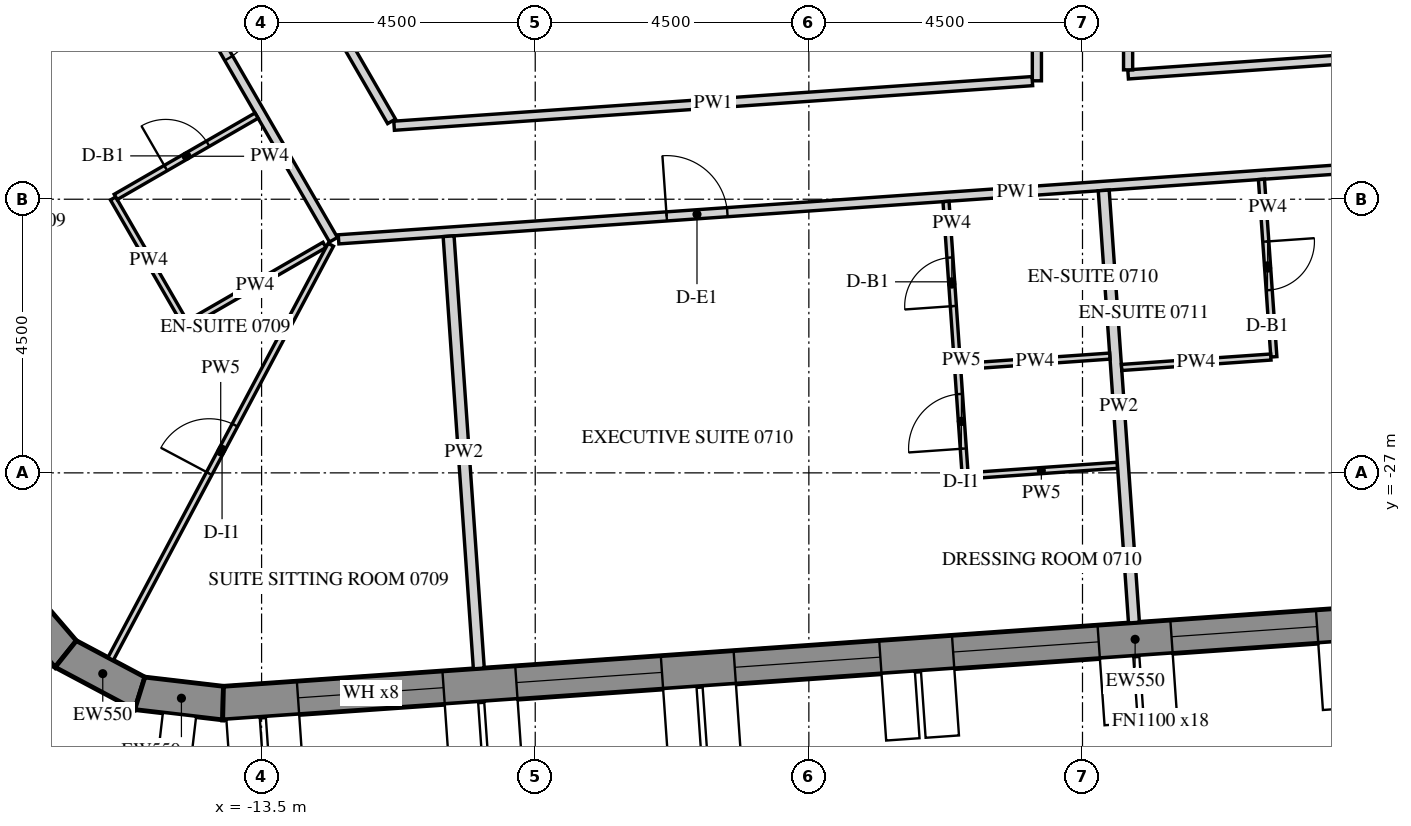
"""IFC4 building model, lengths in metres.
Left out: names, types, materials, properties, quantities, classifications, styles, units other than length and angle.
Written with IfcOpenShell. Run it as: python <this file> out.ifc"""

import sys

from ifc_helpers import new_model, si_unit, direction, frame, frame_2d, origin, place, context, subcontext, project, spatial, polyline, rectangle, outline, extrude, element, fill, save


model = new_model("IFC4")
c1 = context("Model", 3, precision=1e-05, world=origin(), true_north=direction((0.0, 1.0)))
c2 = subcontext(c1, "Body", "Model", "MODEL_VIEW")
j1 = project(units=[si_unit("LENGTHUNIT", "METRE"), si_unit("PLANEANGLEUNIT", "RADIAN")], contexts=[c1])
p1 = place(None, origin())
s1 = spatial("IfcSite", under=j1, at=p1, CompositionType="ELEMENT")
p2 = place(p1, origin())
s2 = spatial("IfcBuilding", under=s1, at=p2, CompositionType="ELEMENT")
p3 = place(p2, frame((0.0, 0.0, 99.9)))
s3 = spatial("IfcBuildingStorey", under=s2, at=p3, CompositionType="ELEMENT", Elevation=99.9)
p4 = place(p3, frame((-17.619, -28.932, -0.15), z_axis=(0.0, 0.0, 1.0), x_axis=(0.651621950847, -0.758543890078, 0.0)))
e1 = element("IfcWall", 1, at=p4, inside=s3, PredefinedType="SOLIDWALL", context=c2, shape_type="SweptSolid", body=[
    extrude(outline(polyline([(-0.026, -0.275), (1.431, -0.275), (1.327, 0.275), (0.026, 0.275), (-0.026, -0.275)])), origin(), (0.0, 0.0, 1.0), 3.9),
])
p5 = place(p3, frame((-16.721, -29.979, -0.15), z_axis=(0.0, 0.0, 1.0), x_axis=(0.882994189209, -0.469383917304, 0.0)))
e2 = element("IfcWall", 2, at=p5, inside=s3, PredefinedType="SOLIDWALL", context=c2, shape_type="SweptSolid", body=[
    extrude(outline(polyline([(-0.052, -0.275), (1.431, -0.275), (1.327, 0.275), (0.052, 0.275), (-0.052, -0.275)])), origin(), (0.0, 0.0, 1.0), 3.9),
])
p6 = place(p3, frame((-15.503, -30.626, -0.15), z_axis=(0.0, 0.0, 1.0), x_axis=(0.993232537394, -0.11614269956, 0.0)))
e3 = element("IfcWall", 3, at=p6, inside=s3, PredefinedType="SOLIDWALL", context=c2, shape_type="SweptSolid", body=[
    extrude(outline(polyline([(-0.052, -0.275), (1.405, -0.275), (1.353, 0.275), (0.052, 0.275), (-0.052, -0.275)])), origin(), (0.0, 0.0, 1.0), 3.9),
])
p7 = place(p3, frame((-14.134, -30.786, -0.15), z_axis=(0.0, 0.0, 1.0), x_axis=(0.997564037441, 0.069756657061, 0.0)))
e4 = element("IfcWall", 4, at=p7, inside=s3, PredefinedType="SOLIDWALL", context=c2, shape_type="SweptSolid", body=[
    extrude(outline(polyline([(-0.026, -0.275), (30.094, -0.275), (30.049, 0.275), (0.026, 0.275), (-0.026, -0.275)])), origin(), (0.0, 0.0, 1.0), 3.9),
])
p8 = place(p7, frame((1.236, 0.0, 1.05)))
e5 = element("IfcOpeningElement", 5, at=p8, cuts=e4, PredefinedType="OPENING", context=c2, shape_type="SweptSolid", body=[
    extrude(rectangle(XDim=2.4, YDim=2.4, at=frame_2d((1.2, 1.2))), frame((0.0, 0.285, 0.0), z_axis=(0.0, -1.0, 0.0), x_axis=(1.0, 0.0, 0.0)), (0.0, 0.0, 1.0), 0.57),
])
p9 = place(p7, frame((4.835, 0.0, 1.05)))
e6 = element("IfcOpeningElement", 6, at=p9, cuts=e4, PredefinedType="OPENING", context=c2, shape_type="SweptSolid", body=[
    extrude(rectangle(XDim=2.4, YDim=2.4, at=frame_2d((1.2, 1.2))), frame((0.0, 0.285, 0.0), z_axis=(0.0, -1.0, 0.0), x_axis=(1.0, 0.0, 0.0)), (0.0, 0.0, 1.0), 0.57),
])
p10 = place(p7, frame((8.436, 0.0, 1.05)))
e7 = element("IfcOpeningElement", 7, at=p10, cuts=e4, PredefinedType="OPENING", context=c2, shape_type="SweptSolid", body=[
    extrude(rectangle(XDim=2.4, YDim=2.4, at=frame_2d((1.2, 1.2))), frame((0.0, 0.285, 0.0), z_axis=(0.0, -1.0, 0.0), x_axis=(1.0, 0.0, 0.0)), (0.0, 0.0, 1.0), 0.57),
])
p11 = place(p7, frame((12.035, 0.0, 1.05)))
e8 = element("IfcOpeningElement", 8, at=p11, cuts=e4, PredefinedType="OPENING", context=c2, shape_type="SweptSolid", body=[
    extrude(rectangle(XDim=2.4, YDim=2.4, at=frame_2d((1.2, 1.2))), frame((0.0, 0.285, 0.0), z_axis=(0.0, -1.0, 0.0), x_axis=(1.0, 0.0, 0.0)), (0.0, 0.0, 1.0), 0.57),
])
p12 = place(p7, frame((15.635, 0.0, 1.05)))
e9 = element("IfcOpeningElement", 9, at=p12, cuts=e4, PredefinedType="OPENING", context=c2, shape_type="SweptSolid", body=[
    extrude(rectangle(XDim=2.4, YDim=2.4, at=frame_2d((1.2, 1.2))), frame((0.0, 0.285, 0.0), z_axis=(0.0, -1.0, 0.0), x_axis=(1.0, 0.0, 0.0)), (0.0, 0.0, 1.0), 0.57),
])
p13 = place(p7, frame((19.236, 0.0, 1.05)))
e10 = element("IfcOpeningElement", 10, at=p13, cuts=e4, PredefinedType="OPENING", context=c2, shape_type="SweptSolid", body=[
    extrude(rectangle(XDim=2.4, YDim=2.4, at=frame_2d((1.2, 1.2))), frame((0.0, 0.285, 0.0), z_axis=(0.0, -1.0, 0.0), x_axis=(1.0, 0.0, 0.0)), (0.0, 0.0, 1.0), 0.57),
])
p14 = place(p7, frame((22.835, 0.0, 1.05)))
e11 = element("IfcOpeningElement", 11, at=p14, cuts=e4, PredefinedType="OPENING", context=c2, shape_type="SweptSolid", body=[
    extrude(rectangle(XDim=2.4, YDim=2.4, at=frame_2d((1.2, 1.2))), frame((0.0, 0.285, 0.0), z_axis=(0.0, -1.0, 0.0), x_axis=(1.0, 0.0, 0.0)), (0.0, 0.0, 1.0), 0.57),
])
p15 = place(p7, frame((26.436, 0.0, 1.05)))
e12 = element("IfcOpeningElement", 12, at=p15, cuts=e4, PredefinedType="OPENING", context=c2, shape_type="SweptSolid", body=[
    extrude(rectangle(XDim=2.4, YDim=2.4, at=frame_2d((1.2, 1.2))), frame((0.0, 0.285, 0.0), z_axis=(0.0, -1.0, 0.0), x_axis=(1.0, 0.0, 0.0)), (0.0, 0.0, 1.0), 0.57),
])
p16 = place(p3, frame((-24.436, -2.175, 0.0), z_axis=(0.0, 0.0, 1.0), x_axis=(0.499996816197, -0.866027241946, 0.0)))
e13 = element("IfcWall", 13, at=p16, inside=s3, PredefinedType="PARTITIONING", context=c2, shape_type="SweptSolid", body=[
    extrude(rectangle(XDim=24.238, YDim=0.15, at=frame_2d((12.119, 0.0))), origin(), (0.0, 0.0, 1.0), 2.988),
])
p17 = place(p16, frame((0.179, 0.0, 0.0)))
e14 = element("IfcOpeningElement", 14, at=p17, cuts=e13, PredefinedType="OPENING", context=c2, shape_type="SweptSolid", body=[
    extrude(rectangle(XDim=1.0, YDim=2.1, at=frame_2d((0.5, 1.05))), frame((0.0, 0.085, 0.0), z_axis=(0.0, -1.0, 0.0), x_axis=(1.0, 0.0, 0.0)), (0.0, 0.0, 1.0), 0.17),
])
p18 = place(p16, frame((12.246, 0.0, 0.0)))
e15 = element("IfcOpeningElement", 15, at=p18, cuts=e13, PredefinedType="OPENING", context=c2, shape_type="SweptSolid", body=[
    extrude(rectangle(XDim=1.0, YDim=2.1, at=frame_2d((0.5, 1.05))), frame((0.0, 0.085, 0.0), z_axis=(0.0, -1.0, 0.0), x_axis=(1.0, 0.0, 0.0)), (0.0, 0.0, 1.0), 0.17),
])
p19 = place(p16, frame((19.792, 0.0, 0.0)))
e16 = element("IfcOpeningElement", 16, at=p19, cuts=e13, PredefinedType="OPENING", context=c2, shape_type="SweptSolid", body=[
    extrude(rectangle(XDim=1.0, YDim=2.1, at=frame_2d((0.5, 1.05))), frame((0.0, 0.085, 0.0), z_axis=(0.0, -1.0, 0.0), x_axis=(1.0, 0.0, 0.0)), (0.0, 0.0, 1.0), 0.17),
])
p20 = place(p3, frame((-12.234, -23.16, 0.0), z_axis=(0.0, 0.0, 1.0), x_axis=(0.997563845372, 0.069759403714, 0.0)))
e17 = element("IfcWall", 17, at=p20, inside=s3, PredefinedType="PARTITIONING", context=c2, shape_type="SweptSolid", body=[
    extrude(rectangle(XDim=22.335, YDim=0.15, at=frame_2d((11.168, 0.0))), origin(), (0.0, 0.0, 1.0), 2.988),
])
p21 = place(p20, frame((5.409, 0.0, 0.0)))
e18 = element("IfcOpeningElement", 18, at=p21, cuts=e17, PredefinedType="OPENING", context=c2, shape_type="SweptSolid", body=[
    extrude(rectangle(XDim=1.0, YDim=2.1, at=frame_2d((0.5, 1.05))), frame((0.0, 0.085, 0.0), z_axis=(0.0, -1.0, 0.0), x_axis=(1.0, 0.0, 0.0)), (0.0, 0.0, 1.0), 0.17),
])
p22 = place(p20, frame((18.272, 0.0, 0.0)))
e19 = element("IfcOpeningElement", 19, at=p22, cuts=e17, PredefinedType="OPENING", context=c2, shape_type="SweptSolid", body=[
    extrude(rectangle(XDim=1.0, YDim=2.1, at=frame_2d((0.5, 1.05))), frame((0.0, 0.085, 0.0), z_axis=(0.0, -1.0, 0.0), x_axis=(1.0, 0.0, 0.0)), (0.0, 0.0, 1.0), 0.17),
])
p23 = place(p3, frame((-0.75, -14.0, 0.0), z_axis=(0.0, 0.0, 1.0), x_axis=(0.0, -1.0, 0.0)))
e20 = element("IfcWall", 20, at=p23, inside=s3, PredefinedType="PARTITIONING", context=c2, shape_type="SweptSolid", body=[
    extrude(rectangle(XDim=6.552, YDim=0.15, at=frame_2d((3.276, 0.0))), origin(), (0.0, 0.0, 1.0), 2.988),
])
p24 = place(p3, frame((-0.825, -20.558, 0.0), z_axis=(0.0, 0.0, 1.0), x_axis=(-0.997564524135, -0.069749696677, 0.0)))
e21 = element("IfcWall", 21, at=p24, inside=s3, PredefinedType="PARTITIONING", context=c2, shape_type="SweptSolid", body=[
    extrude(rectangle(XDim=10.522, YDim=0.15, at=frame_2d((5.261, 0.0))), origin(), (0.0, 0.0, 1.0), 2.988),
])
p25 = place(p3, frame((-11.363, -21.219, 0.0), z_axis=(0.0, 0.0, 1.0), x_axis=(-0.50001451402, 0.866017023949, 0.0)))
e22 = element("IfcWall", 22, at=p25, inside=s3, PredefinedType="PARTITIONING", context=c2, shape_type="SweptSolid", body=[
    extrude(rectangle(XDim=11.674, YDim=0.15, at=frame_2d((5.837, 0.0))), origin(), (0.0, 0.0, 1.0), 2.988),
])
p26 = place(p25, frame((5.387, 0.0, 0.0)))
e23 = element("IfcOpeningElement", 23, at=p26, cuts=e22, PredefinedType="OPENING", context=c2, shape_type="SweptSolid", body=[
    extrude(rectangle(XDim=0.9, YDim=2.1, at=frame_2d((0.45, 1.05))), frame((0.0, 0.085, 0.0), z_axis=(0.0, -1.0, 0.0), x_axis=(1.0, 0.0, 0.0)), (0.0, 0.0, 1.0), 0.17),
])
p27 = place(p3, frame((10.921, -19.736, 0.0), z_axis=(0.0, 0.0, 1.0), x_axis=(-0.997564418338, -0.069751209779, 0.0)))
e24 = element("IfcWall", 24, at=p27, inside=s3, PredefinedType="PARTITIONING", context=c2, shape_type="SweptSolid", body=[
    extrude(rectangle(XDim=10.196, YDim=0.15, at=frame_2d((5.098, 0.0))), origin(), (0.0, 0.0, 1.0), 2.988),
])
p28 = place(p27, frame((4.648, 0.0, 0.0)))
e25 = element("IfcOpeningElement", 25, at=p28, cuts=e24, PredefinedType="OPENING", context=c2, shape_type="SweptSolid", body=[
    extrude(rectangle(XDim=0.9, YDim=2.1, at=frame_2d((0.45, 1.05))), frame((0.0, 0.085, 0.0), z_axis=(0.0, -1.0, 0.0), x_axis=(1.0, 0.0, 0.0)), (0.0, 0.0, 1.0), 0.17),
])
p29 = place(p3, frame((0.75, -20.372, 0.0), z_axis=(0.0, 0.0, 1.0), x_axis=(0.0, 1.0, 0.0)))
e26 = element("IfcWall", 26, at=p29, inside=s3, PredefinedType="PARTITIONING", context=c2, shape_type="SweptSolid", body=[
    extrude(rectangle(XDim=6.372, YDim=0.15, at=frame_2d((3.186, 0.0))), origin(), (0.0, 0.0, 1.0), 2.988),
])
p30 = place(p3, frame((-21.299, -22.009, 0.0), z_axis=(0.0, 0.0, 1.0), x_axis=(0.866024672353, 0.500001266874, 0.0)))
e27 = element("IfcWall", 27, at=p30, inside=s3, PredefinedType="PARTITIONING", context=c2, shape_type="SweptSolid", body=[
    extrude(rectangle(XDim=7.125, YDim=0.18, at=frame_2d((3.562, 0.0))), origin(), (0.0, 0.0, 1.0), 2.988),
])
p31 = place(p3, frame((-12.466, -23.251, 0.0), z_axis=(0.0, 0.0, 1.0), x_axis=(-0.866017009382, -0.50001453925, 0.0)))
e28 = element("IfcWall", 28, at=p31, inside=s3, PredefinedType="PARTITIONING", context=c2, shape_type="SweptSolid", body=[
    extrude(rectangle(XDim=2.629, YDim=0.1, at=frame_2d((1.314, 0.0))), origin(), (0.0, 0.0, 1.0), 2.988),
])
p32 = place(p3, frame((-14.767, -24.522, 0.0), z_axis=(0.0, 0.0, 1.0), x_axis=(-0.499938297808, 0.866061024631, 0.0)))
e29 = element("IfcWall", 29, at=p32, inside=s3, PredefinedType="PARTITIONING", context=c2, shape_type="SweptSolid", body=[
    extrude(rectangle(XDim=2.35, YDim=0.1, at=frame_2d((1.175, 0.0))), origin(), (0.0, 0.0, 1.0), 2.988),
])
p33 = place(p3, frame((-15.899, -22.462, 0.0), z_axis=(0.0, 0.0, 1.0), x_axis=(0.86604424267, 0.499967368674, 0.0)))
e30 = element("IfcWall", 30, at=p33, inside=s3, PredefinedType="PARTITIONING", context=c2, shape_type="SweptSolid", body=[
    extrude(rectangle(XDim=2.675, YDim=0.1, at=frame_2d((1.337, 0.0))), origin(), (0.0, 0.0, 1.0), 2.988),
])
p34 = place(p33, frame((0.95, 0.0, 0.0)))
e31 = element("IfcOpeningElement", 31, at=p34, cuts=e30, PredefinedType="OPENING", context=c2, shape_type="SweptSolid", body=[
    extrude(rectangle(XDim=0.8, YDim=2.1, at=frame_2d((0.4, 1.05))), frame((0.0, 0.06, 0.0), z_axis=(0.0, -1.0, 0.0), x_axis=(1.0, 0.0, 0.0)), (0.0, 0.0, 1.0), 0.12),
])
p35 = place(p3, frame((-15.983, -30.059, 0.0), z_axis=(0.0, 0.0, 1.0), x_axis=(0.469495384778, 0.882934926069, 0.0)))
e32 = element("IfcWall", 32, at=p35, inside=s3, PredefinedType="PARTITIONING", context=c2, shape_type="SweptSolid", body=[
    extrude(rectangle(XDim=7.713, YDim=0.1, at=frame_2d((3.856, 0.0))), origin(), (0.0, 0.0, 1.0), 2.988),
])
p36 = place(p35, frame((3.454, 0.0, 0.0)))
e33 = element("IfcOpeningElement", 33, at=p36, cuts=e32, PredefinedType="OPENING", context=c2, shape_type="SweptSolid", body=[
    extrude(rectangle(XDim=0.9, YDim=2.1, at=frame_2d((0.45, 1.05))), frame((0.0, 0.06, 0.0), z_axis=(0.0, -1.0, 0.0), x_axis=(1.0, 0.0, 0.0)), (0.0, 0.0, 1.0), 0.12),
])
p37 = place(p3, frame((-9.927, -30.216, 0.0), z_axis=(0.0, 0.0, 1.0), x_axis=(-0.069764000094, 0.997563523938, 0.0)))
e34 = element("IfcWall", 34, at=p37, inside=s3, PredefinedType="PARTITIONING", context=c2, shape_type="SweptSolid", body=[
    extrude(rectangle(XDim=7.125, YDim=0.18, at=frame_2d((3.562, 0.0))), origin(), (0.0, 0.0, 1.0), 2.988),
])
p38 = place(p3, frame((-2.054, -25.255, 0.0), z_axis=(0.0, 0.0, 1.0), x_axis=(-0.069789009646, 0.997561774595, 0.0)))
e35 = element("IfcWall", 35, at=p38, inside=s3, PredefinedType="PARTITIONING", context=c2, shape_type="SweptSolid", body=[
    extrude(rectangle(XDim=2.725, YDim=0.1, at=frame_2d((1.363, 0.0))), origin(), (0.0, 0.0, 1.0), 2.988),
])
p39 = place(p38, frame((1.0, 0.0, 0.0)))
e36 = element("IfcOpeningElement", 36, at=p39, cuts=e35, PredefinedType="OPENING", context=c2, shape_type="SweptSolid", body=[
    extrude(rectangle(XDim=0.8, YDim=2.1, at=frame_2d((0.4, 1.05))), frame((0.0, 0.06, 0.0), z_axis=(0.0, -1.0, 0.0), x_axis=(1.0, 0.0, 0.0)), (0.0, 0.0, 1.0), 0.12),
])
p40 = place(p3, frame((0.575, -26.875, 0.0), z_axis=(0.0, 0.0, 1.0), x_axis=(-0.997558425079, -0.069836871022, 0.0)))
e37 = element("IfcWall", 37, at=p40, inside=s3, PredefinedType="PARTITIONING", context=c2, shape_type="SweptSolid", body=[
    extrude(rectangle(XDim=2.51, YDim=0.1, at=frame_2d((1.255, 0.0))), origin(), (0.0, 0.0, 1.0), 2.988),
])
p41 = place(p3, frame((-1.932, -27.0, 0.0), z_axis=(0.0, 0.0, 1.0), x_axis=(-0.069797686069, 0.997561167558, 0.0)))
e38 = element("IfcWall", 38, at=p41, inside=s3, PredefinedType="PARTITIONING", context=c2, shape_type="SweptSolid", body=[
    extrude(rectangle(XDim=1.7, YDim=0.1, at=frame_2d((0.85, 0.0))), origin(), (0.0, 0.0, 1.0), 2.988),
])
p42 = place(p41, frame((0.4, 0.0, 0.0)))
e39 = element("IfcOpeningElement", 39, at=p42, cuts=e38, PredefinedType="OPENING", context=c2, shape_type="SweptSolid", body=[
    extrude(rectangle(XDim=0.9, YDim=2.1, at=frame_2d((0.45, 1.05))), frame((0.0, 0.06, 0.0), z_axis=(0.0, -1.0, 0.0), x_axis=(1.0, 0.0, 0.0)), (0.0, 0.0, 1.0), 0.12),
])
p43 = place(p3, frame((0.846, -29.463, 0.0), z_axis=(0.0, 0.0, 1.0), x_axis=(-0.069764000094, 0.997563523938, 0.0)))
e40 = element("IfcWall", 40, at=p43, inside=s3, PredefinedType="PARTITIONING", context=c2, shape_type="SweptSolid", body=[
    extrude(rectangle(XDim=7.125, YDim=0.18, at=frame_2d((3.562, 0.0))), origin(), (0.0, 0.0, 1.0), 2.988),
])
p44 = place(p3, frame((-2.005, -25.251, 0.0), z_axis=(0.0, 0.0, 1.0), x_axis=(0.997570291305, 0.069667165191, 0.0)))
e41 = element("IfcWall", 41, at=p44, inside=s3, PredefinedType="PARTITIONING", context=c2, shape_type="SweptSolid", body=[
    extrude(rectangle(XDim=2.46, YDim=0.1, at=frame_2d((1.23, 0.0))), origin(), (0.0, 0.0, 1.0), 2.988),
])
p45 = place(p3, frame((2.943, -22.174, 0.0), z_axis=(0.0, 0.0, 1.0), x_axis=(0.069781781132, -0.997562280272, 0.0)))
e42 = element("IfcWall", 42, at=p45, inside=s3, PredefinedType="PARTITIONING", context=c2, shape_type="SweptSolid", body=[
    extrude(rectangle(XDim=2.925, YDim=0.1, at=frame_2d((1.462, 0.0))), origin(), (0.0, 0.0, 1.0), 2.988),
])
p46 = place(p45, frame((1.025, 0.0, 0.0)))
e43 = element("IfcOpeningElement", 43, at=p46, cuts=e42, PredefinedType="OPENING", context=c2, shape_type="SweptSolid", body=[
    extrude(rectangle(XDim=0.8, YDim=2.1, at=frame_2d((0.4, 1.05))), frame((0.0, 0.06, 0.0), z_axis=(0.0, -1.0, 0.0), x_axis=(1.0, 0.0, 0.0)), (0.0, 0.0, 1.0), 0.12),
])
p47 = place(p3, frame((3.097, -25.095, 0.0), z_axis=(0.0, 0.0, 1.0), x_axis=(-0.997562906323, -0.069772830877, 0.0)))
e44 = element("IfcWall", 44, at=p47, inside=s3, PredefinedType="PARTITIONING", context=c2, shape_type="SweptSolid", body=[
    extrude(rectangle(XDim=2.46, YDim=0.1, at=frame_2d((1.23, 0.0))), origin(), (0.0, 0.0, 1.0), 2.988),
])
p48 = place(p8, frame((0.0, 0.205, 0.0)))
e45 = element("IfcWindow", 45, at=p48, inside=s3, PartitioningType="DOUBLE_PANEL_VERTICAL", PredefinedType="WINDOW", context=c2, shape_type="SweptSolid", body=[
    extrude(rectangle(XDim=2.4, YDim=2.4, at=frame_2d((1.2, 1.2))), frame((0.0, 0.03, 0.0), z_axis=(0.0, -1.0, 0.0), x_axis=(1.0, 0.0, 0.0)), (0.0, 0.0, 1.0), 0.06),
])
fill(e5, e45)
p49 = place(p9, frame((0.0, 0.205, 0.0)))
e46 = element("IfcWindow", 46, at=p49, inside=s3, PartitioningType="DOUBLE_PANEL_VERTICAL", PredefinedType="WINDOW", context=c2, shape_type="SweptSolid", body=[
    extrude(rectangle(XDim=2.4, YDim=2.4, at=frame_2d((1.2, 1.2))), frame((0.0, 0.03, 0.0), z_axis=(0.0, -1.0, 0.0), x_axis=(1.0, 0.0, 0.0)), (0.0, 0.0, 1.0), 0.06),
])
fill(e6, e46)
p50 = place(p10, frame((0.0, 0.205, 0.0)))
e47 = element("IfcWindow", 47, at=p50, inside=s3, PartitioningType="DOUBLE_PANEL_VERTICAL", PredefinedType="WINDOW", context=c2, shape_type="SweptSolid", body=[
    extrude(rectangle(XDim=2.4, YDim=2.4, at=frame_2d((1.2, 1.2))), frame((0.0, 0.03, 0.0), z_axis=(0.0, -1.0, 0.0), x_axis=(1.0, 0.0, 0.0)), (0.0, 0.0, 1.0), 0.06),
])
fill(e7, e47)
p51 = place(p11, frame((0.0, 0.205, 0.0)))
e48 = element("IfcWindow", 48, at=p51, inside=s3, PartitioningType="DOUBLE_PANEL_VERTICAL", PredefinedType="WINDOW", context=c2, shape_type="SweptSolid", body=[
    extrude(rectangle(XDim=2.4, YDim=2.4, at=frame_2d((1.2, 1.2))), frame((0.0, 0.03, 0.0), z_axis=(0.0, -1.0, 0.0), x_axis=(1.0, 0.0, 0.0)), (0.0, 0.0, 1.0), 0.06),
])
fill(e8, e48)
p52 = place(p12, frame((0.0, 0.205, 0.0)))
e49 = element("IfcWindow", 49, at=p52, inside=s3, PartitioningType="DOUBLE_PANEL_VERTICAL", PredefinedType="WINDOW", context=c2, shape_type="SweptSolid", body=[
    extrude(rectangle(XDim=2.4, YDim=2.4, at=frame_2d((1.2, 1.2))), frame((0.0, 0.03, 0.0), z_axis=(0.0, -1.0, 0.0), x_axis=(1.0, 0.0, 0.0)), (0.0, 0.0, 1.0), 0.06),
])
fill(e9, e49)
p53 = place(p19, origin())
e50 = element("IfcDoor", 50, at=p53, inside=s3, OperationType="SINGLE_SWING_RIGHT", PredefinedType="DOOR", context=c2, shape_type="SweptSolid", body=[
    extrude(rectangle(XDim=1.0, YDim=2.1, at=frame_2d((0.5, 1.05))), frame((0.0, 0.025, 0.0), z_axis=(0.0, -1.0, 0.0), x_axis=(1.0, 0.0, 0.0)), (0.0, 0.0, 1.0), 0.05),
])
fill(e16, e50)
p54 = place(p34, origin())
e51 = element("IfcDoor", 51, at=p54, inside=s3, OperationType="SINGLE_SWING_RIGHT", PredefinedType="DOOR", context=c2, shape_type="SweptSolid", body=[
    extrude(rectangle(XDim=0.8, YDim=2.1, at=frame_2d((0.4, 1.05))), frame((0.0, 0.025, 0.0), z_axis=(0.0, -1.0, 0.0), x_axis=(1.0, 0.0, 0.0)), (0.0, 0.0, 1.0), 0.05),
])
fill(e31, e51)
p55 = place(p36, origin())
e52 = element("IfcDoor", 52, at=p55, inside=s3, OperationType="SINGLE_SWING_LEFT", PredefinedType="DOOR", context=c2, shape_type="SweptSolid", body=[
    extrude(rectangle(XDim=0.9, YDim=2.1, at=frame_2d((0.45, 1.05))), frame((0.0, 0.025, 0.0), z_axis=(0.0, -1.0, 0.0), x_axis=(1.0, 0.0, 0.0)), (0.0, 0.0, 1.0), 0.05),
])
fill(e33, e52)
p56 = place(p21, origin())
e53 = element("IfcDoor", 53, at=p56, inside=s3, OperationType="SINGLE_SWING_LEFT", PredefinedType="DOOR", context=c2, shape_type="SweptSolid", body=[
    extrude(rectangle(XDim=1.0, YDim=2.1, at=frame_2d((0.5, 1.05))), frame((0.0, 0.025, 0.0), z_axis=(0.0, -1.0, 0.0), x_axis=(1.0, 0.0, 0.0)), (0.0, 0.0, 1.0), 0.05),
])
fill(e18, e53)
p57 = place(p39, origin())
e54 = element("IfcDoor", 54, at=p57, inside=s3, OperationType="SINGLE_SWING_LEFT", PredefinedType="DOOR", context=c2, shape_type="SweptSolid", body=[
    extrude(rectangle(XDim=0.8, YDim=2.1, at=frame_2d((0.4, 1.05))), frame((0.0, 0.025, 0.0), z_axis=(0.0, -1.0, 0.0), x_axis=(1.0, 0.0, 0.0)), (0.0, 0.0, 1.0), 0.05),
])
fill(e36, e54)
p58 = place(p42, origin())
e55 = element("IfcDoor", 55, at=p58, inside=s3, OperationType="SINGLE_SWING_RIGHT", PredefinedType="DOOR", context=c2, shape_type="SweptSolid", body=[
    extrude(rectangle(XDim=0.9, YDim=2.1, at=frame_2d((0.45, 1.05))), frame((0.0, 0.025, 0.0), z_axis=(0.0, -1.0, 0.0), x_axis=(1.0, 0.0, 0.0)), (0.0, 0.0, 1.0), 0.05),
])
fill(e39, e55)
p59 = place(p46, origin())
e56 = element("IfcDoor", 56, at=p59, inside=s3, OperationType="SINGLE_SWING_RIGHT", PredefinedType="DOOR", context=c2, shape_type="SweptSolid", body=[
    extrude(rectangle(XDim=0.8, YDim=2.1, at=frame_2d((0.4, 1.05))), frame((0.0, 0.025, 0.0), z_axis=(0.0, -1.0, 0.0), x_axis=(1.0, 0.0, 0.0)), (0.0, 0.0, 1.0), 0.05),
])
fill(e43, e56)
save(model, sys.argv[1])
